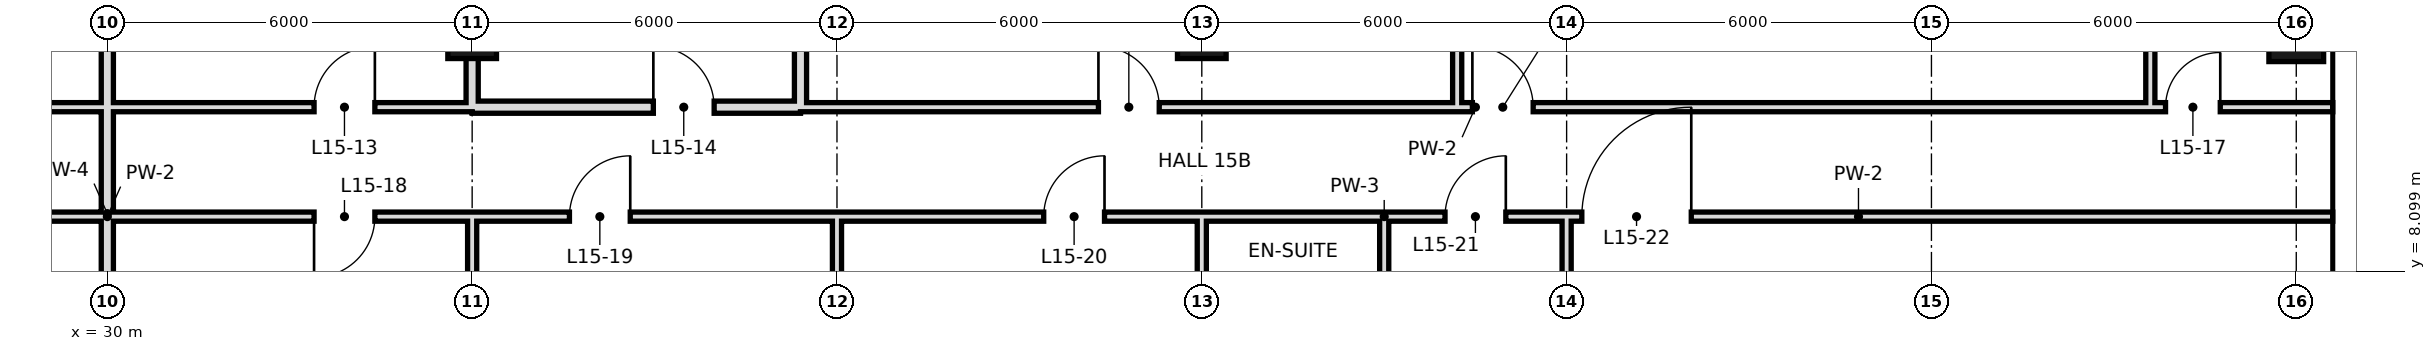
"""IFC4 building model, lengths in metres.
Left out: names, types, materials, properties, quantities, classifications, styles, units other than length and angle.
Written with IfcOpenShell. Run it as: python <this file> out.ifc"""

import sys

from ifc_helpers import new_model, si_unit, direction, frame, frame_2d, origin, origin_2d, place, context, subcontext, project, spatial, rectangle, hollow_rectangle, extrude, element, fill, save


model = new_model("IFC4")
c1 = context("Model", 3, precision=1e-05, world=origin(), true_north=direction((0.0, 1.0)))
c2 = subcontext(c1, "Body", "Model", "MODEL_VIEW")
j1 = project(units=[si_unit("LENGTHUNIT", "METRE"), si_unit("PLANEANGLEUNIT", "RADIAN")], contexts=[c1])
p1 = place(None, origin())
s1 = spatial("IfcSite", under=j1, at=p1, CompositionType="ELEMENT")
p2 = place(p1, origin())
s2 = spatial("IfcBuilding", under=s1, at=p2, CompositionType="ELEMENT")
p3 = place(p2, frame((0.0, 0.0, 75.0)))
s3 = spatial("IfcBuildingStorey", under=s2, at=p3, CompositionType="ELEMENT", Elevation=75.0)
for number, where, z_axis, x_axis in (
    (1, (36.0, 12.0, 0.0), (0.0, 0.0, 1.0), (1.0, 0.0, 0.0)),
    (2, (48.0, 12.0, 0.0), (0.0, 0.0, 1.0), (1.0, 0.0, 0.0)),
):
    element("IfcColumn", number, at=place(p3, frame(where, z_axis=z_axis, x_axis=x_axis)), inside=s3, PredefinedType="COLUMN", context=c2, shape_type="SweptSolid", body=[
        extrude(hollow_rectangle(XDim=0.8, YDim=0.8, WallThickness=0.04, at=origin_2d()), origin(), (0.0, 0.0, 1.0), 3.6),
    ])
p4 = place(p3, frame((66.0, 12.0, 0.0), z_axis=(0.0, 0.0, 1.0), x_axis=(1.0, 0.0, 0.0)))
e3 = element("IfcColumn", 3, at=p4, inside=s3, PredefinedType="COLUMN", context=c2, shape_type="SweptSolid", body=[
    extrude(hollow_rectangle(XDim=0.9, YDim=0.9, WallThickness=0.045, at=origin_2d()), origin(), (0.0, 0.0, 1.0), 3.6),
])
p5 = place(p3, frame((30.0, -0.6, 0.0), z_axis=(0.0, 0.0, 1.0), x_axis=(0.0, 1.0, 0.0)))
e4 = element("IfcWall", 4, at=p5, inside=s3, PredefinedType="SOLIDWALL", context=c2, shape_type="SweptSolid", body=[
    extrude(rectangle(XDim=19.3, YDim=0.2, at=frame_2d((9.65, 0.0))), origin(), (0.0, 0.0, 1.0), 2.72),
])
p6 = place(p3, frame((36.0, 10.8, 0.0), z_axis=(0.0, 0.0, 1.0), x_axis=(0.0, 1.0, 0.0)))
e5 = element("IfcWall", 5, at=p6, inside=s3, PredefinedType="SOLIDWALL", context=c2, shape_type="SweptSolid", body=[
    extrude(rectangle(XDim=7.9, YDim=0.2, at=frame_2d((3.95, 0.0))), origin(), (0.0, 0.0, 1.0), 2.72),
])
p7 = place(p3, frame((36.0, 0.0, 0.0), z_axis=(0.0, 0.0, 1.0), x_axis=(0.0, 1.0, 0.0)))
e6 = element("IfcWall", 6, at=p7, inside=s3, PredefinedType="PARTITIONING", context=c2, shape_type="SweptSolid", body=[
    extrude(rectangle(XDim=9.0, YDim=0.15, at=frame_2d((4.5, 0.0))), origin(), (0.0, 0.0, 1.0), 2.72),
])
p8 = place(p3, frame((41.4, 10.8, 0.0), z_axis=(0.0, 0.0, 1.0), x_axis=(0.0, 1.0, 0.0)))
e7 = element("IfcWall", 7, at=p8, inside=s3, PredefinedType="SOLIDWALL", context=c2, shape_type="SweptSolid", body=[
    extrude(rectangle(XDim=7.9, YDim=0.2, at=frame_2d((3.95, 0.0))), origin(), (0.0, 0.0, 1.0), 2.72),
])
p9 = place(p3, frame((42.0, -0.6, 0.0), z_axis=(0.0, 0.0, 1.0), x_axis=(0.0, 1.0, 0.0)))
e8 = element("IfcWall", 8, at=p9, inside=s3, PredefinedType="PARTITIONING", context=c2, shape_type="SweptSolid", body=[
    extrude(rectangle(XDim=9.6, YDim=0.15, at=frame_2d((4.8, 0.0))), origin(), (0.0, 0.0, 1.0), 2.72),
])
p10 = place(p3, frame((48.0, 6.0, 0.0), z_axis=(0.0, 0.0, 1.0), x_axis=(0.0, 1.0, 0.0)))
e9 = element("IfcWall", 9, at=p10, inside=s3, PredefinedType="PARTITIONING", context=c2, shape_type="SweptSolid", body=[
    extrude(rectangle(XDim=3.0, YDim=0.15, at=frame_2d((1.5, 0.0))), origin(), (0.0, 0.0, 1.0), 2.72),
])
p11 = place(p3, frame((51.0, 6.0, 0.0), z_axis=(0.0, 0.0, 1.0), x_axis=(0.0, 1.0, 0.0)))
e10 = element("IfcWall", 10, at=p11, inside=s3, PredefinedType="PARTITIONING", context=c2, shape_type="SweptSolid", body=[
    extrude(rectangle(XDim=3.0, YDim=0.15, at=frame_2d((1.5, 0.0))), origin(), (0.0, 0.0, 1.0), 3.42),
])
p12 = place(p3, frame((52.2, 10.8, 0.0), z_axis=(0.0, 0.0, 1.0), x_axis=(0.0, 1.0, 0.0)))
e11 = element("IfcWall", 11, at=p12, inside=s3, PredefinedType="PARTITIONING", context=c2, shape_type="SweptSolid", body=[
    extrude(rectangle(XDim=7.2, YDim=0.15, at=frame_2d((3.6, 0.0))), origin(), (0.0, 0.0, 1.0), 3.42),
])
p13 = place(p3, frame((54.0, -0.6, 0.0), z_axis=(0.0, 0.0, 1.0), x_axis=(0.0, 1.0, 0.0)))
e12 = element("IfcWall", 12, at=p13, inside=s3, PredefinedType="PARTITIONING", context=c2, shape_type="SweptSolid", body=[
    extrude(rectangle(XDim=9.6, YDim=0.15, at=frame_2d((4.8, 0.0))), origin(), (0.0, 0.0, 1.0), 3.42),
])
p14 = place(p3, frame((63.6, 10.8, 0.0), z_axis=(0.0, 0.0, 1.0), x_axis=(0.0, 1.0, 0.0)))
e13 = element("IfcWall", 13, at=p14, inside=s3, PredefinedType="PARTITIONING", context=c2, shape_type="SweptSolid", body=[
    extrude(rectangle(XDim=7.2, YDim=0.15, at=frame_2d((3.6, 0.0))), origin(), (0.0, 0.0, 1.0), 3.42),
])
p15 = place(p3, frame((36.0, 10.8, 0.0), z_axis=(0.0, 0.0, 1.0), x_axis=(1.0, 0.0, 0.0)))
e14 = element("IfcWall", 14, at=p15, inside=s3, PredefinedType="SOLIDWALL", context=c2, shape_type="SweptSolid", body=[
    extrude(rectangle(XDim=5.4, YDim=0.2, at=frame_2d((2.7, 0.0))), origin(), (0.0, 0.0, 1.0), 2.72),
])
p16 = place(p15, frame((2.98, 0.0, 0.0)))
e15 = element("IfcOpeningElement", 15, at=p16, cuts=e14, PredefinedType="OPENING", context=c2, shape_type="SweptSolid", body=[
    extrude(rectangle(XDim=1.0, YDim=2.4, at=frame_2d((0.5, 1.2))), frame((0.0, 0.11, 0.0), z_axis=(0.0, -1.0, 0.0), x_axis=(1.0, 0.0, 0.0)), (0.0, 0.0, 1.0), 0.22),
])
p17 = place(p3, frame((6.6, 10.8, 0.0), z_axis=(0.0, 0.0, 1.0), x_axis=(1.0, 0.0, 0.0)))
e16 = element("IfcWall", 16, at=p17, inside=s3, PredefinedType="PARTITIONING", context=c2, shape_type="SweptSolid", body=[
    extrude(rectangle(XDim=29.4, YDim=0.15, at=frame_2d((14.7, 0.0))), origin(), (0.0, 0.0, 1.0), 3.42),
])
p18 = place(p17, frame((2.5, 0.0, 0.0)))
e17 = element("IfcOpeningElement", 17, at=p18, cuts=e16, PredefinedType="OPENING", context=c2, shape_type="SweptSolid", body=[
    extrude(rectangle(XDim=1.0, YDim=2.4, at=frame_2d((0.5, 1.2))), frame((0.0, 0.085, 0.0), z_axis=(0.0, -1.0, 0.0), x_axis=(1.0, 0.0, 0.0)), (0.0, 0.0, 1.0), 0.17),
])
p19 = place(p17, frame((7.96, 0.0, 0.0)))
e18 = element("IfcOpeningElement", 18, at=p19, cuts=e16, PredefinedType="OPENING", context=c2, shape_type="SweptSolid", body=[
    extrude(rectangle(XDim=1.0, YDim=2.4, at=frame_2d((0.5, 1.2))), frame((0.0, 0.085, 0.0), z_axis=(0.0, -1.0, 0.0), x_axis=(1.0, 0.0, 0.0)), (0.0, 0.0, 1.0), 0.17),
])
p20 = place(p17, frame((19.54, 0.0, 0.0)))
e19 = element("IfcOpeningElement", 19, at=p20, cuts=e16, PredefinedType="OPENING", context=c2, shape_type="SweptSolid", body=[
    extrude(rectangle(XDim=1.0, YDim=2.4, at=frame_2d((0.5, 1.2))), frame((0.0, 0.085, 0.0), z_axis=(0.0, -1.0, 0.0), x_axis=(1.0, 0.0, 0.0)), (0.0, 0.0, 1.0), 0.17),
])
p21 = place(p17, frame((26.8, 0.0, 0.0)))
e20 = element("IfcOpeningElement", 20, at=p21, cuts=e16, PredefinedType="OPENING", context=c2, shape_type="SweptSolid", body=[
    extrude(rectangle(XDim=1.0, YDim=2.4, at=frame_2d((0.5, 1.2))), frame((0.0, 0.085, 0.0), z_axis=(0.0, -1.0, 0.0), x_axis=(1.0, 0.0, 0.0)), (0.0, 0.0, 1.0), 0.17),
])
p22 = place(p3, frame((41.4, 10.8, 0.0), z_axis=(0.0, 0.0, 1.0), x_axis=(1.0, 0.0, 0.0)))
e21 = element("IfcWall", 21, at=p22, inside=s3, PredefinedType="PARTITIONING", context=c2, shape_type="SweptSolid", body=[
    extrude(rectangle(XDim=22.2, YDim=0.15, at=frame_2d((11.1, 0.0))), origin(), (0.0, 0.0, 1.0), 3.42),
])
p23 = place(p22, frame((4.9, 0.0, 0.0)))
e22 = element("IfcOpeningElement", 22, at=p23, cuts=e21, PredefinedType="OPENING", context=c2, shape_type="SweptSolid", body=[
    extrude(rectangle(XDim=1.0, YDim=2.4, at=frame_2d((0.5, 1.2))), frame((0.0, 0.085, 0.0), z_axis=(0.0, -1.0, 0.0), x_axis=(1.0, 0.0, 0.0)), (0.0, 0.0, 1.0), 0.17),
])
p24 = place(p22, frame((11.05, 0.0, 0.0)))
e23 = element("IfcOpeningElement", 23, at=p24, cuts=e21, PredefinedType="OPENING", context=c2, shape_type="SweptSolid", body=[
    extrude(rectangle(XDim=1.0, YDim=2.4, at=frame_2d((0.5, 1.2))), frame((0.0, 0.085, 0.0), z_axis=(0.0, -1.0, 0.0), x_axis=(1.0, 0.0, 0.0)), (0.0, 0.0, 1.0), 0.17),
])
p25 = place(p3, frame((63.6, 10.8, 0.0), z_axis=(0.0, 0.0, 1.0), x_axis=(1.0, 0.0, 0.0)))
e24 = element("IfcWall", 24, at=p25, inside=s3, PredefinedType="PARTITIONING", context=c2, shape_type="SweptSolid", body=[
    extrude(rectangle(XDim=3.0, YDim=0.15, at=frame_2d((1.5, 0.0))), origin(), (0.0, 0.0, 1.0), 3.42),
])
p26 = place(p25, frame((0.25, 0.0, 0.0)))
e25 = element("IfcOpeningElement", 25, at=p26, cuts=e24, PredefinedType="OPENING", context=c2, shape_type="SweptSolid", body=[
    extrude(rectangle(XDim=0.9, YDim=2.4, at=frame_2d((0.45, 1.2))), frame((0.0, 0.085, 0.0), z_axis=(0.0, -1.0, 0.0), x_axis=(1.0, 0.0, 0.0)), (0.0, 0.0, 1.0), 0.17),
])
p27 = place(p3, frame((12.0, 9.0, 0.0), z_axis=(0.0, 0.0, 1.0), x_axis=(1.0, 0.0, 0.0)))
e26 = element("IfcWall", 26, at=p27, inside=s3, PredefinedType="PARTITIONING", context=c2, shape_type="SweptSolid", body=[
    extrude(rectangle(XDim=36.0, YDim=0.15, at=frame_2d((18.0, 0.0))), origin(), (0.0, 0.0, 1.0), 3.42),
])
p28 = place(p27, frame((5.1, 0.0, 0.0)))
e27 = element("IfcOpeningElement", 27, at=p28, cuts=e26, PredefinedType="OPENING", context=c2, shape_type="SweptSolid", body=[
    extrude(rectangle(XDim=1.8, YDim=2.4, at=frame_2d((0.9, 1.2))), frame((0.0, 0.085, 0.0), z_axis=(0.0, -1.0, 0.0), x_axis=(1.0, 0.0, 0.0)), (0.0, 0.0, 1.0), 0.17),
])
p29 = place(p27, frame((13.6, 0.0, 0.0)))
e28 = element("IfcOpeningElement", 28, at=p29, cuts=e26, PredefinedType="OPENING", context=c2, shape_type="SweptSolid", body=[
    extrude(rectangle(XDim=1.0, YDim=2.4, at=frame_2d((0.5, 1.2))), frame((0.0, 0.085, 0.0), z_axis=(0.0, -1.0, 0.0), x_axis=(1.0, 0.0, 0.0)), (0.0, 0.0, 1.0), 0.17),
])
p30 = place(p27, frame((21.4, 0.0, 0.0)))
e29 = element("IfcOpeningElement", 29, at=p30, cuts=e26, PredefinedType="OPENING", context=c2, shape_type="SweptSolid", body=[
    extrude(rectangle(XDim=1.0, YDim=2.4, at=frame_2d((0.5, 1.2))), frame((0.0, 0.085, 0.0), z_axis=(0.0, -1.0, 0.0), x_axis=(1.0, 0.0, 0.0)), (0.0, 0.0, 1.0), 0.17),
])
p31 = place(p27, frame((25.6, 0.0, 0.0)))
e30 = element("IfcOpeningElement", 30, at=p31, cuts=e26, PredefinedType="OPENING", context=c2, shape_type="SweptSolid", body=[
    extrude(rectangle(XDim=1.0, YDim=2.4, at=frame_2d((0.5, 1.2))), frame((0.0, 0.085, 0.0), z_axis=(0.0, -1.0, 0.0), x_axis=(1.0, 0.0, 0.0)), (0.0, 0.0, 1.0), 0.17),
])
p32 = place(p27, frame((33.4, 0.0, 0.0)))
e31 = element("IfcOpeningElement", 31, at=p32, cuts=e26, PredefinedType="OPENING", context=c2, shape_type="SweptSolid", body=[
    extrude(rectangle(XDim=1.0, YDim=2.4, at=frame_2d((0.5, 1.2))), frame((0.0, 0.085, 0.0), z_axis=(0.0, -1.0, 0.0), x_axis=(1.0, 0.0, 0.0)), (0.0, 0.0, 1.0), 0.17),
])
p33 = place(p3, frame((51.0, 9.0, 0.0), z_axis=(0.0, 0.0, 1.0), x_axis=(1.0, 0.0, 0.0)))
e32 = element("IfcWall", 32, at=p33, inside=s3, PredefinedType="PARTITIONING", context=c2, shape_type="SweptSolid", body=[
    extrude(rectangle(XDim=15.6, YDim=0.15, at=frame_2d((7.8, 0.0))), origin(), (0.0, 0.0, 1.0), 3.42),
])
p34 = place(p33, frame((1.0, 0.0, 0.0)))
e33 = element("IfcOpeningElement", 33, at=p34, cuts=e32, PredefinedType="OPENING", context=c2, shape_type="SweptSolid", body=[
    extrude(rectangle(XDim=1.0, YDim=2.4, at=frame_2d((0.5, 1.2))), frame((0.0, 0.085, 0.0), z_axis=(0.0, -1.0, 0.0), x_axis=(1.0, 0.0, 0.0)), (0.0, 0.0, 1.0), 0.17),
])
p35 = place(p33, frame((3.25, 0.0, 0.0)))
e34 = element("IfcOpeningElement", 34, at=p35, cuts=e32, PredefinedType="OPENING", context=c2, shape_type="SweptSolid", body=[
    extrude(rectangle(XDim=1.8, YDim=2.4, at=frame_2d((0.9, 1.2))), frame((0.0, 0.085, 0.0), z_axis=(0.0, -1.0, 0.0), x_axis=(1.0, 0.0, 0.0)), (0.0, 0.0, 1.0), 0.17),
])
p36 = place(p3, frame((48.0, 9.0, 0.0), z_axis=(0.0, 0.0, 1.0), x_axis=(1.0, 0.0, 0.0)))
e35 = element("IfcWall", 35, at=p36, inside=s3, PredefinedType="PARTITIONING", context=c2, shape_type="SweptSolid", body=[
    extrude(rectangle(XDim=3.0, YDim=0.15, at=frame_2d((1.5, 0.0))), origin(), (0.0, 0.0, 1.0), 3.42),
])
p37 = place(p21, frame((1.0, 0.0, 0.0), z_axis=(0.0, 0.0, 1.0), x_axis=(-1.0, 0.0, 0.0)))
e36 = element("IfcDoor", 36, at=p37, inside=s3, OperationType="SINGLE_SWING_LEFT", PredefinedType="DOOR", context=c2, shape_type="SweptSolid", body=[
    extrude(rectangle(XDim=1.0, YDim=2.4, at=frame_2d((0.5, 1.2))), frame((0.0, 0.025, 0.0), z_axis=(0.0, -1.0, 0.0), x_axis=(1.0, 0.0, 0.0)), (0.0, 0.0, 1.0), 0.05),
])
fill(e20, e36)
p38 = place(p16, origin())
e37 = element("IfcDoor", 37, at=p38, inside=s3, OperationType="SINGLE_SWING_LEFT", PredefinedType="DOOR", context=c2, shape_type="SweptSolid", body=[
    extrude(rectangle(XDim=1.0, YDim=2.4, at=frame_2d((0.5, 1.2))), frame((0.0, 0.025, 0.0), z_axis=(0.0, -1.0, 0.0), x_axis=(1.0, 0.0, 0.0)), (0.0, 0.0, 1.0), 0.05),
])
fill(e15, e37)
p39 = place(p23, origin())
e38 = element("IfcDoor", 38, at=p39, inside=s3, OperationType="SINGLE_SWING_LEFT", PredefinedType="DOOR", context=c2, shape_type="SweptSolid", body=[
    extrude(rectangle(XDim=1.0, YDim=2.4, at=frame_2d((0.5, 1.2))), frame((0.0, 0.025, 0.0), z_axis=(0.0, -1.0, 0.0), x_axis=(1.0, 0.0, 0.0)), (0.0, 0.0, 1.0), 0.05),
])
fill(e22, e38)
p40 = place(p24, origin())
e39 = element("IfcDoor", 39, at=p40, inside=s3, OperationType="SINGLE_SWING_LEFT", PredefinedType="DOOR", context=c2, shape_type="SweptSolid", body=[
    extrude(rectangle(XDim=1.0, YDim=2.4, at=frame_2d((0.5, 1.2))), frame((0.0, 0.025, 0.0), z_axis=(0.0, -1.0, 0.0), x_axis=(1.0, 0.0, 0.0)), (0.0, 0.0, 1.0), 0.05),
])
fill(e23, e39)
p41 = place(p26, frame((0.9, 0.0, 0.0), z_axis=(0.0, 0.0, 1.0), x_axis=(-1.0, 0.0, 0.0)))
e40 = element("IfcDoor", 40, at=p41, inside=s3, OperationType="SINGLE_SWING_LEFT", PredefinedType="DOOR", context=c2, shape_type="SweptSolid", body=[
    extrude(rectangle(XDim=0.9, YDim=2.4, at=frame_2d((0.45, 1.2))), frame((0.0, 0.025, 0.0), z_axis=(0.0, -1.0, 0.0), x_axis=(1.0, 0.0, 0.0)), (0.0, 0.0, 1.0), 0.05),
])
fill(e25, e40)
p42 = place(p30, frame((1.0, 0.0, 0.0), z_axis=(0.0, 0.0, 1.0), x_axis=(-1.0, 0.0, 0.0)))
e41 = element("IfcDoor", 41, at=p42, inside=s3, OperationType="SINGLE_SWING_RIGHT", PredefinedType="DOOR", context=c2, shape_type="SweptSolid", body=[
    extrude(rectangle(XDim=1.0, YDim=2.4, at=frame_2d((0.5, 1.2))), frame((0.0, 0.025, 0.0), z_axis=(0.0, -1.0, 0.0), x_axis=(1.0, 0.0, 0.0)), (0.0, 0.0, 1.0), 0.05),
])
fill(e29, e41)
p43 = place(p31, frame((1.0, 0.0, 0.0), z_axis=(0.0, 0.0, 1.0), x_axis=(-1.0, 0.0, 0.0)))
e42 = element("IfcDoor", 42, at=p43, inside=s3, OperationType="SINGLE_SWING_LEFT", PredefinedType="DOOR", context=c2, shape_type="SweptSolid", body=[
    extrude(rectangle(XDim=1.0, YDim=2.4, at=frame_2d((0.5, 1.2))), frame((0.0, 0.025, 0.0), z_axis=(0.0, -1.0, 0.0), x_axis=(1.0, 0.0, 0.0)), (0.0, 0.0, 1.0), 0.05),
])
fill(e30, e42)
p44 = place(p32, frame((1.0, 0.0, 0.0), z_axis=(0.0, 0.0, 1.0), x_axis=(-1.0, 0.0, 0.0)))
e43 = element("IfcDoor", 43, at=p44, inside=s3, OperationType="SINGLE_SWING_LEFT", PredefinedType="DOOR", context=c2, shape_type="SweptSolid", body=[
    extrude(rectangle(XDim=1.0, YDim=2.4, at=frame_2d((0.5, 1.2))), frame((0.0, 0.025, 0.0), z_axis=(0.0, -1.0, 0.0), x_axis=(1.0, 0.0, 0.0)), (0.0, 0.0, 1.0), 0.05),
])
fill(e31, e43)
p45 = place(p34, frame((1.0, 0.0, 0.0), z_axis=(0.0, 0.0, 1.0), x_axis=(-1.0, 0.0, 0.0)))
e44 = element("IfcDoor", 44, at=p45, inside=s3, OperationType="SINGLE_SWING_LEFT", PredefinedType="DOOR", context=c2, shape_type="SweptSolid", body=[
    extrude(rectangle(XDim=1.0, YDim=2.4, at=frame_2d((0.5, 1.2))), frame((0.0, 0.025, 0.0), z_axis=(0.0, -1.0, 0.0), x_axis=(1.0, 0.0, 0.0)), (0.0, 0.0, 1.0), 0.05),
])
fill(e33, e44)
p46 = place(p35, frame((1.8, 0.0, 0.0), z_axis=(0.0, 0.0, 1.0), x_axis=(-1.0, 0.0, 0.0)))
e45 = element("IfcDoor", 45, at=p46, inside=s3, OperationType="SINGLE_SWING_LEFT", PredefinedType="DOOR", context=c2, shape_type="SweptSolid", body=[
    extrude(rectangle(XDim=1.8, YDim=2.4, at=frame_2d((0.9, 1.2))), frame((0.0, 0.025, 0.0), z_axis=(0.0, -1.0, 0.0), x_axis=(1.0, 0.0, 0.0)), (0.0, 0.0, 1.0), 0.05),
])
fill(e34, e45)
save(model, sys.argv[1])
